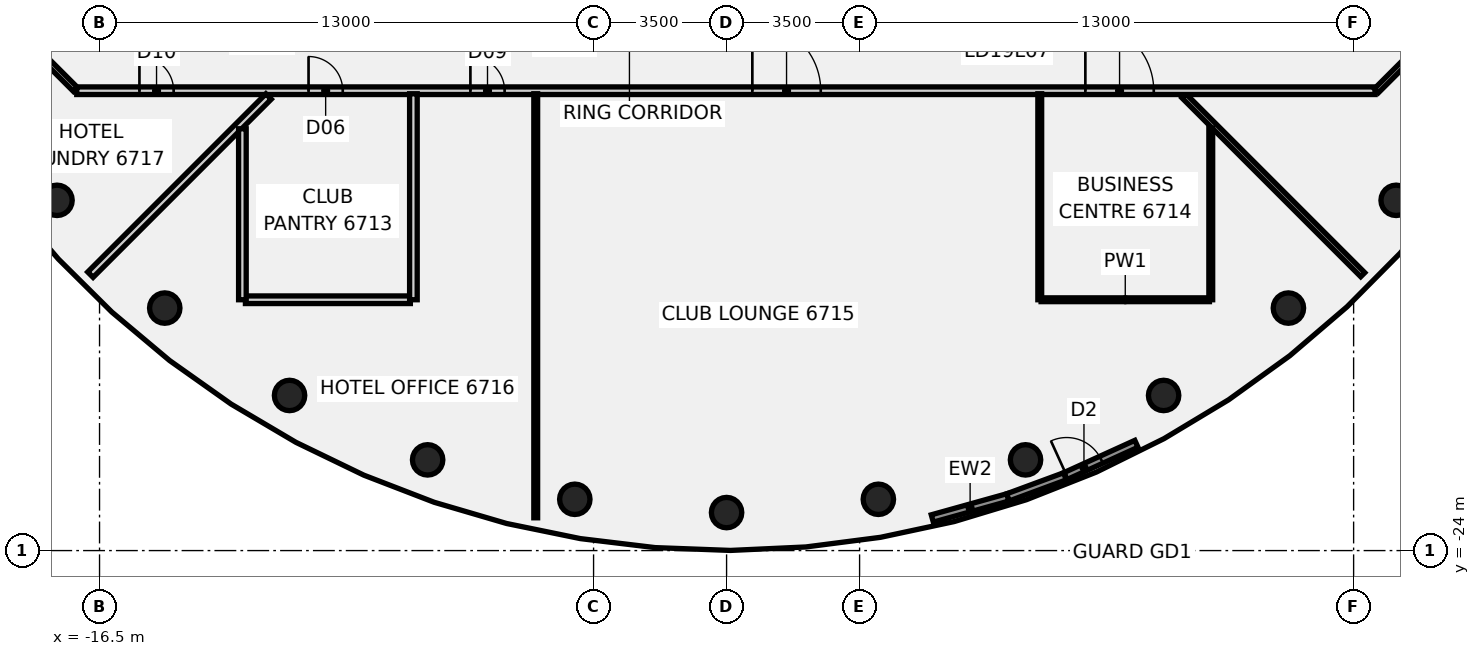
"""IFC4 building model, lengths in metres.
Left out: names, types, materials, properties, quantities, classifications, styles, units other than length and angle.
Written with IfcOpenShell. Run it as: python <this file> out.ifc"""

import sys

from ifc_helpers import new_model, si_unit, direction, frame, frame_2d, origin, origin_2d, place, context, subcontext, project, spatial, rectangle, circle, extrude, element, fill, save


model = new_model("IFC4")
c1 = context("Model", 3, precision=1e-05, world=origin(), true_north=direction((0.0, 1.0)))
c2 = subcontext(c1, "Body", "Model", "MODEL_VIEW")
j1 = project(units=[si_unit("LENGTHUNIT", "METRE"), si_unit("PLANEANGLEUNIT", "RADIAN")], contexts=[c1])
p1 = place(None, origin())
s1 = spatial("IfcSite", under=j1, at=p1, CompositionType="ELEMENT")
p2 = place(p1, origin())
s2 = spatial("IfcBuilding", under=s1, at=p2, CompositionType="ELEMENT")
p3 = place(p2, frame((0.0, 0.0, 264.0)))
s3 = spatial("IfcBuildingStorey", under=s2, at=p3, CompositionType="ELEMENT", Elevation=264.0)
for number, where, z_axis, x_axis in (
    (1, (-17.619, -14.784, -0.14), (0.0, 0.0, 1.0), (1.0, 0.0, 0.0)),
    (2, (-14.784, -17.619, -0.14), (0.0, 0.0, 1.0), (1.0, 0.0, 0.0)),
    (3, (-11.5, -19.919, -0.14), (0.0, 0.0, 1.0), (1.0, 0.0, 0.0)),
    (4, (-7.866, -21.613, -0.14), (0.0, 0.0, 1.0), (1.0, 0.0, 0.0)),
    (5, (-3.994, -22.651, -0.14), (0.0, 0.0, 1.0), (1.0, 0.0, 0.0)),
    (6, (0.0, -23.0, -0.14), (0.0, 0.0, 1.0), (1.0, 0.0, 0.0)),
    (7, (3.994, -22.651, -0.14), (0.0, 0.0, 1.0), (1.0, 0.0, 0.0)),
    (8, (7.866, -21.613, -0.14), (0.0, 0.0, 1.0), (1.0, 0.0, 0.0)),
    (9, (11.5, -19.919, -0.14), (0.0, 0.0, 1.0), (1.0, 0.0, 0.0)),
    (10, (14.784, -17.619, -0.14), (0.0, 0.0, 1.0), (1.0, 0.0, 0.0)),
    (11, (17.619, -14.784, -0.14), (0.0, 0.0, 1.0), (1.0, 0.0, 0.0)),
):
    element("IfcColumn", number, at=place(p3, frame(where, z_axis=z_axis, x_axis=x_axis)), inside=s3, PredefinedType="COLUMN", context=c2, shape_type="SweptSolid", body=[
        extrude(circle(Radius=0.4, at=origin_2d()), origin(), (0.0, 0.0, 1.0), 3.6),
    ])
p4 = place(p3, frame((-18.872, -10.128, 0.0), z_axis=(0.0, 0.0, 1.0), x_axis=(0.707106781187, -0.707106781187, 0.0)))
e12 = element("IfcWall", 12, at=p4, inside=s3, PredefinedType="PARTITIONING", context=c2, shape_type="SweptSolid", body=[
    extrude(rectangle(XDim=2.455, YDim=0.15, at=frame_2d((1.228, 0.0))), origin(), (0.0, 0.0, 1.0), 2.864),
])
p5 = place(p3, frame((12.034, -12.034, 0.0), z_axis=(0.0, 0.0, 1.0), x_axis=(0.707106781187, -0.707106781187, 0.0)))
e13 = element("IfcWall", 13, at=p5, inside=s3, PredefinedType="PARTITIONING", context=c2, shape_type="SweptSolid", body=[
    extrude(rectangle(XDim=6.655, YDim=0.15, at=frame_2d((3.328, 0.0))), origin(), (0.0, 0.0, 1.0), 2.864),
])
p6 = place(p3, frame((-17.1, -11.9, 0.0), z_axis=(0.0, 0.0, 1.0), x_axis=(1.0, 0.0, 0.0)))
e14 = element("IfcWall", 14, at=p6, inside=s3, PredefinedType="PARTITIONING", context=c2, shape_type="SweptSolid", body=[
    extrude(rectangle(XDim=34.165, YDim=0.2, at=frame_2d((17.083, 0.0))), origin(), (0.0, 0.0, 1.0), 2.864),
])
p7 = place(p6, frame((6.1, 0.0, 0.0)))
e15 = element("IfcOpeningElement", 15, at=p7, cuts=e14, PredefinedType="OPENING", context=c2, shape_type="SweptSolid", body=[
    extrude(rectangle(XDim=0.9, YDim=2.1, at=frame_2d((0.45, 1.05))), frame((0.0, 0.11, 0.0), z_axis=(0.0, -1.0, 0.0), x_axis=(1.0, 0.0, 0.0)), (0.0, 0.0, 1.0), 0.22),
])
p8 = place(p6, frame((26.541, 0.0, 0.0)))
e16 = element("IfcOpeningElement", 16, at=p8, cuts=e14, PredefinedType="OPENING", context=c2, shape_type="SweptSolid", body=[
    extrude(rectangle(XDim=1.8, YDim=2.1, at=frame_2d((0.9, 1.05))), frame((0.0, 0.11, 0.0), z_axis=(0.0, -1.0, 0.0), x_axis=(1.0, 0.0, 0.0)), (0.0, 0.0, 1.0), 0.22),
])
p9 = place(p6, frame((17.778, 0.0, 0.0)))
e17 = element("IfcOpeningElement", 17, at=p9, cuts=e14, PredefinedType="OPENING", context=c2, shape_type="SweptSolid", body=[
    extrude(rectangle(XDim=1.8, YDim=2.1, at=frame_2d((0.9, 1.05))), frame((0.0, 0.11, 0.0), z_axis=(0.0, -1.0, 0.0), x_axis=(1.0, 0.0, 0.0)), (0.0, 0.0, 1.0), 0.22),
])
p10 = place(p6, frame((10.359, 0.0, 0.0)))
e18 = element("IfcOpeningElement", 18, at=p10, cuts=e14, PredefinedType="OPENING", context=c2, shape_type="SweptSolid", body=[
    extrude(rectangle(XDim=0.9, YDim=2.1, at=frame_2d((0.45, 1.05))), frame((0.0, 0.11, 0.0), z_axis=(0.0, -1.0, 0.0), x_axis=(1.0, 0.0, 0.0)), (0.0, 0.0, 1.0), 0.22),
])
p11 = place(p6, frame((1.65, 0.0, 0.0)))
e19 = element("IfcOpeningElement", 19, at=p11, cuts=e14, PredefinedType="OPENING", context=c2, shape_type="SweptSolid", body=[
    extrude(rectangle(XDim=0.9, YDim=2.1, at=frame_2d((0.45, 1.05))), frame((0.0, 0.11, 0.0), z_axis=(0.0, -1.0, 0.0), x_axis=(1.0, 0.0, 0.0)), (0.0, 0.0, 1.0), 0.22),
])
p12 = place(p3, frame((-12.661, -17.4, 0.0), z_axis=(0.0, 0.0, 1.0), x_axis=(1.0, 0.0, 0.0)))
e20 = element("IfcWall", 20, at=p12, inside=s3, PredefinedType="PARTITIONING", context=c2, shape_type="SweptSolid", body=[
    extrude(rectangle(XDim=4.34, YDim=0.2, at=frame_2d((2.17, 0.0))), origin(), (0.0, 0.0, 1.0), 2.864),
])
p13 = place(p3, frame((8.276, -17.4, 0.0), z_axis=(0.0, 0.0, 1.0), x_axis=(1.0, 0.0, 0.0)))
e21 = element("IfcWall", 21, at=p13, inside=s3, PredefinedType="PARTITIONING", context=c2, shape_type="SweptSolid", body=[
    extrude(rectangle(XDim=4.43, YDim=0.1, at=frame_2d((2.215, 0.0))), origin(), (0.0, 0.0, 1.0), 2.864),
])
p14 = place(p3, frame((-16.74, -16.74, 0.0), z_axis=(0.0, 0.0, 1.0), x_axis=(0.707106781187, 0.707106781187, 0.0)))
e22 = element("IfcWall", 22, at=p14, inside=s3, PredefinedType="PARTITIONING", context=c2, shape_type="SweptSolid", body=[
    extrude(rectangle(XDim=6.631, YDim=0.2, at=frame_2d((3.315, 0.0))), origin(), (0.0, 0.0, 1.0), 2.864),
])
p15 = place(p3, frame((17.1, -11.9, 0.0), z_axis=(0.0, 0.0, 1.0), x_axis=(0.707106781187, 0.707106781187, 0.0)))
e23 = element("IfcWall", 23, at=p15, inside=s3, PredefinedType="PARTITIONING", context=c2, shape_type="SweptSolid", body=[
    extrude(rectangle(XDim=2.505, YDim=0.15, at=frame_2d((1.253, 0.0))), origin(), (0.0, 0.0, 1.0), 2.864),
])
p16 = place(p3, frame((-12.741, -17.4, 0.0), z_axis=(0.0, 0.0, 1.0), x_axis=(0.0, 1.0, 0.0)))
e24 = element("IfcWall", 24, at=p16, inside=s3, PredefinedType="PARTITIONING", context=c2, shape_type="SweptSolid", body=[
    extrude(rectangle(XDim=4.499, YDim=0.2, at=frame_2d((2.25, 0.0))), origin(), (0.0, 0.0, 1.0), 2.864),
])
p17 = place(p3, frame((-8.241, -17.4, 0.0), z_axis=(0.0, 0.0, 1.0), x_axis=(0.0, 1.0, 0.0)))
e25 = element("IfcWall", 25, at=p17, inside=s3, PredefinedType="PARTITIONING", context=c2, shape_type="SweptSolid", body=[
    extrude(rectangle(XDim=5.42, YDim=0.2, at=frame_2d((2.71, 0.0))), origin(), (0.0, 0.0, 1.0), 2.864),
])
p18 = place(p3, frame((-5.022, -23.137, 0.0), z_axis=(0.0, 0.0, 1.0), x_axis=(0.0, 1.0, 0.0)))
e26 = element("IfcWall", 26, at=p18, inside=s3, PredefinedType="PARTITIONING", context=c2, shape_type="SweptSolid", body=[
    extrude(rectangle(XDim=11.157, YDim=0.1, at=frame_2d((5.579, 0.0))), origin(), (0.0, 0.0, 1.0), 2.864),
])
p19 = place(p3, frame((8.241, -17.4, 0.0), z_axis=(0.0, 0.0, 1.0), x_axis=(0.0, 1.0, 0.0)))
e27 = element("IfcWall", 27, at=p19, inside=s3, PredefinedType="PARTITIONING", context=c2, shape_type="SweptSolid", body=[
    extrude(rectangle(XDim=5.42, YDim=0.1, at=frame_2d((2.71, 0.0))), origin(), (0.0, 0.0, 1.0), 2.864),
])
p20 = place(p3, frame((12.741, -17.4, 0.0), z_axis=(0.0, 0.0, 1.0), x_axis=(0.0, 1.0, 0.0)))
e28 = element("IfcWall", 28, at=p20, inside=s3, PredefinedType="PARTITIONING", context=c2, shape_type="SweptSolid", body=[
    extrude(rectangle(XDim=4.519, YDim=0.1, at=frame_2d((2.259, 0.0))), origin(), (0.0, 0.0, 1.0), 2.864),
])
p21 = place(p3, frame((5.413, -23.155, 0.0), z_axis=(0.0, 0.0, 1.0), x_axis=(0.963204125622, 0.268770929203, 0.0)))
e29 = element("IfcWall", 29, at=p21, inside=s3, PredefinedType="SOLIDWALL", context=c2, shape_type="SweptSolid", body=[
    extrude(rectangle(XDim=2.066, YDim=0.2, at=frame_2d((1.033, 0.0))), origin(), (0.0, 0.0, 1.0), 3.46),
])
p22 = place(p3, frame((8.904, -22.046, 0.0), z_axis=(0.0, 0.0, 1.0), x_axis=(0.910249082094, 0.414061116923, 0.0)))
e30 = element("IfcWall", 30, at=p22, inside=s3, PredefinedType="SOLIDWALL", context=c2, shape_type="SweptSolid", body=[
    extrude(rectangle(XDim=2.066, YDim=0.2, at=frame_2d((1.033, 0.0))), origin(), (0.0, 0.0, 1.0), 3.46),
])
p23 = place(p22, frame((0.05, 0.0, 0.0)))
e31 = element("IfcOpeningElement", 31, at=p23, cuts=e30, PredefinedType="OPENING", context=c2, shape_type="SweptSolid", body=[
    extrude(rectangle(XDim=1.0, YDim=2.4, at=frame_2d((0.5, 1.2))), frame((0.0, 0.11, 0.0), z_axis=(0.0, -1.0, 0.0), x_axis=(1.0, 0.0, 0.0)), (0.0, 0.0, 1.0), 0.22),
])
p24 = place(p3, frame((7.404, -22.6, 0.0), z_axis=(0.0, 0.0, 1.0), x_axis=(0.938105634582, 0.346349272217, 0.0)))
e32 = element("IfcWall", 32, at=p24, inside=s3, PredefinedType="SOLIDWALL", context=c2, shape_type="SweptSolid", body=[
    extrude(rectangle(XDim=1.599, YDim=0.2, at=frame_2d((0.799, 0.0))), origin(), (0.0, 0.0, 1.0), 3.46),
])
p25 = place(p7, frame((0.9, 0.0, 0.0), z_axis=(0.0, 0.0, 1.0), x_axis=(-1.0, 0.0, 0.0)))
e33 = element("IfcDoor", 33, at=p25, inside=s3, OperationType="SINGLE_SWING_LEFT", PredefinedType="DOOR", context=c2, shape_type="SweptSolid", body=[
    extrude(rectangle(XDim=0.9, YDim=2.1, at=frame_2d((0.45, 1.05))), frame((0.0, 0.025, 0.0), z_axis=(0.0, -1.0, 0.0), x_axis=(1.0, 0.0, 0.0)), (0.0, 0.0, 1.0), 0.05),
])
fill(e15, e33)
p26 = place(p8, frame((1.8, 0.0, 0.0), z_axis=(0.0, 0.0, 1.0), x_axis=(-1.0, 0.0, 0.0)))
e34 = element("IfcDoor", 34, at=p26, inside=s3, OperationType="DOUBLE_DOOR_SINGLE_SWING", PredefinedType="DOOR", context=c2, shape_type="SweptSolid", body=[
    extrude(rectangle(XDim=1.8, YDim=2.1, at=frame_2d((0.9, 1.05))), frame((0.0, 0.025, 0.0), z_axis=(0.0, -1.0, 0.0), x_axis=(1.0, 0.0, 0.0)), (0.0, 0.0, 1.0), 0.05),
])
fill(e16, e34)
p27 = place(p9, origin())
e35 = element("IfcDoor", 35, at=p27, inside=s3, OperationType="DOUBLE_DOOR_SINGLE_SWING", PredefinedType="DOOR", context=c2, shape_type="SweptSolid", body=[
    extrude(rectangle(XDim=1.8, YDim=2.1, at=frame_2d((0.9, 1.05))), frame((0.0, 0.025, 0.0), z_axis=(0.0, -1.0, 0.0), x_axis=(1.0, 0.0, 0.0)), (0.0, 0.0, 1.0), 0.05),
])
fill(e17, e35)
p28 = place(p10, frame((0.9, 0.0, 0.0), z_axis=(0.0, 0.0, 1.0), x_axis=(-1.0, 0.0, 0.0)))
e36 = element("IfcDoor", 36, at=p28, inside=s3, OperationType="SINGLE_SWING_LEFT", PredefinedType="DOOR", context=c2, shape_type="SweptSolid", body=[
    extrude(rectangle(XDim=0.9, YDim=2.1, at=frame_2d((0.45, 1.05))), frame((0.0, 0.025, 0.0), z_axis=(0.0, -1.0, 0.0), x_axis=(1.0, 0.0, 0.0)), (0.0, 0.0, 1.0), 0.05),
])
fill(e18, e36)
p29 = place(p11, frame((0.9, 0.0, 0.0), z_axis=(0.0, 0.0, 1.0), x_axis=(-1.0, 0.0, 0.0)))
e37 = element("IfcDoor", 37, at=p29, inside=s3, OperationType="SINGLE_SWING_LEFT", PredefinedType="DOOR", context=c2, shape_type="SweptSolid", body=[
    extrude(rectangle(XDim=0.9, YDim=2.1, at=frame_2d((0.45, 1.05))), frame((0.0, 0.025, 0.0), z_axis=(0.0, -1.0, 0.0), x_axis=(1.0, 0.0, 0.0)), (0.0, 0.0, 1.0), 0.05),
])
fill(e19, e37)
p30 = place(p23, origin())
e38 = element("IfcDoor", 38, at=p30, inside=s3, OperationType="SINGLE_SWING_LEFT", PredefinedType="DOOR", context=c2, shape_type="SweptSolid", body=[
    extrude(rectangle(XDim=1.0, YDim=2.4, at=frame_2d((0.5, 1.2))), frame((0.0, 0.025, 0.0), z_axis=(0.0, -1.0, 0.0), x_axis=(1.0, 0.0, 0.0)), (0.0, 0.0, 1.0), 0.05),
])
fill(e31, e38)
save(model, sys.argv[1])
